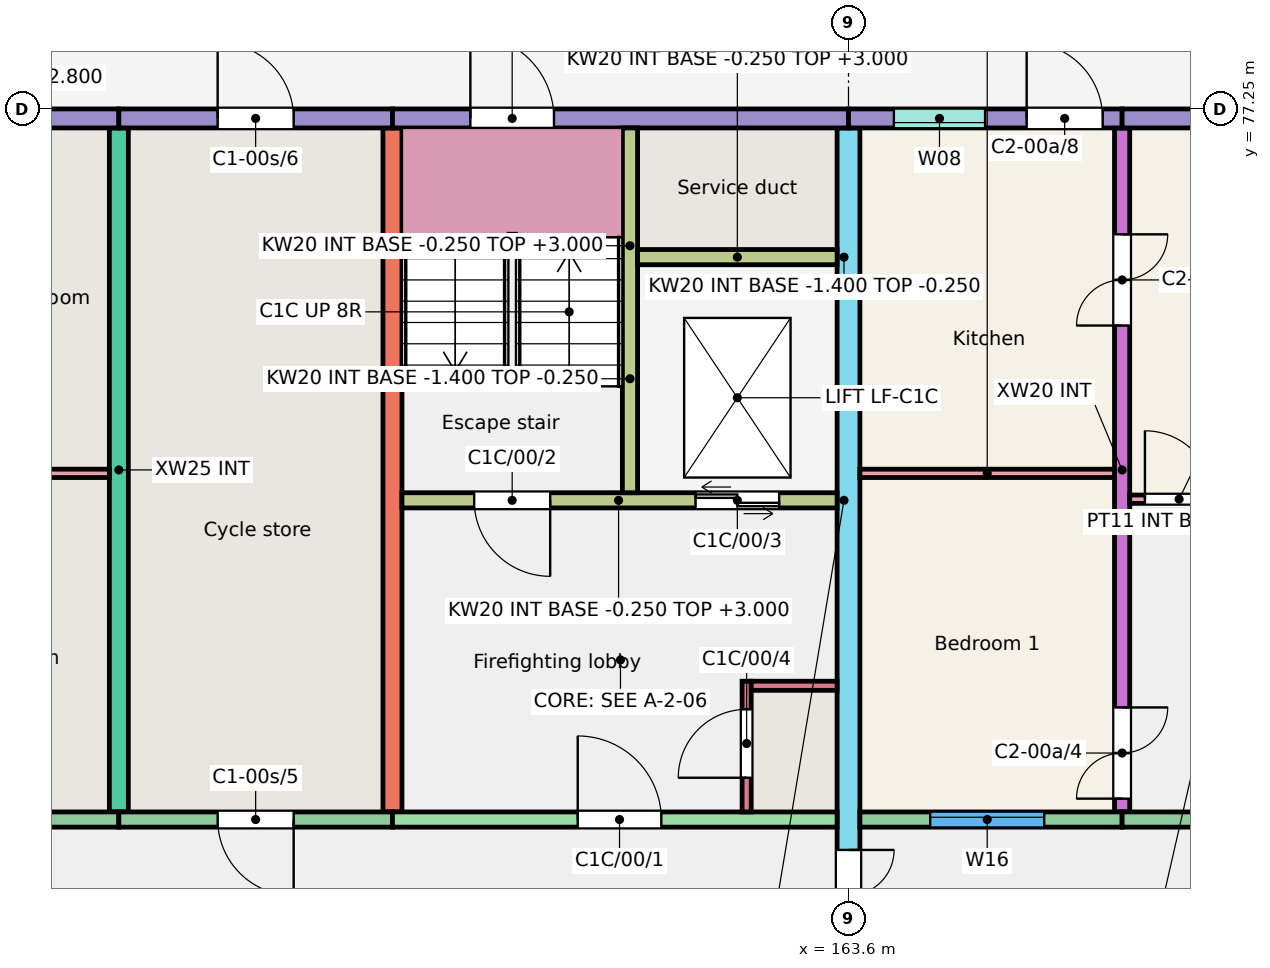
"""IFC4 building model, lengths in metres.
Left out: names, types, materials, properties, quantities, classifications, styles, units other than length and angle.
Written with IfcOpenShell. Run it as: python <this file> out.ifc"""

import sys

from ifc_helpers import new_model, si_unit, direction, frame, frame_2d, origin, place, context, subcontext, project, spatial, rectangle, extrude, element, fill, save


model = new_model("IFC4")
c1 = context("Model", 3, precision=1e-05, world=origin(), true_north=direction((0.0, 1.0)))
c2 = subcontext(c1, "Body", "Model", "MODEL_VIEW")
j1 = project(units=[si_unit("LENGTHUNIT", "METRE"), si_unit("PLANEANGLEUNIT", "RADIAN")], contexts=[c1])
p1 = place(None, origin())
s1 = spatial("IfcSite", under=j1, at=p1, CompositionType="ELEMENT")
p2 = place(p1, origin())
s2 = spatial("IfcBuilding", under=s1, at=p2, CompositionType="ELEMENT")
p3 = place(p2, origin())
s3 = spatial("IfcBuildingStorey", under=s2, at=p3, CompositionType="ELEMENT", Elevation=0.0)
for number, where, z_axis, x_axis in (
    (1, (154.0, 68.0, -0.25), (0.0, 0.0, 1.0), (0.0, 1.0, 0.0)),
    (2, (157.6, 68.0, -0.25), (0.0, 0.0, 1.0), (0.0, 1.0, 0.0)),
):
    element("IfcWall", number, at=place(p3, frame(where, z_axis=z_axis, x_axis=x_axis)), inside=s3, PredefinedType="SHEAR", context=c2, shape_type="SweptSolid", body=[
        extrude(rectangle(XDim=9.0, YDim=0.25, at=frame_2d((4.5, 0.0))), origin(), (0.0, 0.0, 1.0), 3.25),
    ])
p4 = place(p3, frame((163.6, 66.0, -0.25), z_axis=(0.0, 0.0, 1.0), x_axis=(0.0, 1.0, 0.0)))
e3 = element("IfcWall", 3, at=p4, inside=s3, PredefinedType="SHEAR", context=c2, shape_type="SweptSolid", body=[
    extrude(rectangle(XDim=11.0, YDim=0.3, at=frame_2d((5.5, 0.0))), origin(), (0.0, 0.0, 1.0), 3.25),
])
p5 = place(p4, frame((0.3, 0.0, 0.25)))
e4 = element("IfcOpeningElement", 4, at=p5, cuts=e3, PredefinedType="OPENING", context=c2, shape_type="SweptSolid", body=[
    extrude(rectangle(XDim=1.2, YDim=2.1, at=frame_2d((0.6, 1.05))), frame((0.0, 0.16, 0.0), z_axis=(0.0, -1.0, 0.0), x_axis=(1.0, 0.0, 0.0)), (0.0, 0.0, 1.0), 0.32),
])
p6 = place(p3, frame((167.2, 68.0, -0.25), z_axis=(0.0, 0.0, 1.0), x_axis=(0.0, 1.0, 0.0)))
e5 = element("IfcWall", 5, at=p6, inside=s3, PredefinedType="SHEAR", context=c2, shape_type="SweptSolid", body=[
    extrude(rectangle(XDim=9.0, YDim=0.2, at=frame_2d((4.5, 0.0))), origin(), (0.0, 0.0, 1.0), 3.25),
])
p7 = place(p6, frame((0.175, 0.0, 0.25)))
e6 = element("IfcOpeningElement", 6, at=p7, cuts=e5, PredefinedType="OPENING", context=c2, shape_type="SweptSolid", body=[
    extrude(rectangle(XDim=1.2, YDim=2.1, at=frame_2d((0.6, 1.05))), frame((0.0, 0.11, 0.0), z_axis=(0.0, -1.0, 0.0), x_axis=(1.0, 0.0, 0.0)), (0.0, 0.0, 1.0), 0.22),
])
p8 = place(p6, frame((6.4, 0.0, 0.25)))
e7 = element("IfcOpeningElement", 7, at=p8, cuts=e5, PredefinedType="OPENING", context=c2, shape_type="SweptSolid", body=[
    extrude(rectangle(XDim=1.2, YDim=2.1, at=frame_2d((0.6, 1.05))), frame((0.0, 0.11, 0.0), z_axis=(0.0, -1.0, 0.0), x_axis=(1.0, 0.0, 0.0)), (0.0, 0.0, 1.0), 0.22),
])
p9 = place(p3, frame((150.4, 77.125, -0.25), z_axis=(0.0, 0.0, 1.0), x_axis=(1.0, 0.0, 0.0)))
e8 = element("IfcWall", 8, at=p9, inside=s3, PredefinedType="SOLIDWALL", context=c2, shape_type="SweptSolid", body=[
    extrude(rectangle(XDim=3.6, YDim=0.25, at=frame_2d((1.8, 0.0))), origin(), (0.0, 0.0, 1.0), 3.25),
])
p10 = place(p3, frame((150.4, 67.9, -0.25), z_axis=(0.0, 0.0, 1.0), x_axis=(1.0, 0.0, 0.0)))
e9 = element("IfcWall", 9, at=p10, inside=s3, PredefinedType="SOLIDWALL", context=c2, shape_type="SweptSolid", body=[
    extrude(rectangle(XDim=3.6, YDim=0.2, at=frame_2d((1.8, 0.0))), origin(), (0.0, 0.0, 1.0), 3.25),
])
p11 = place(p10, frame((1.3, 0.0, 0.25)))
e10 = element("IfcOpeningElement", 10, at=p11, cuts=e9, PredefinedType="OPENING", context=c2, shape_type="SweptSolid", body=[
    extrude(rectangle(XDim=1.0, YDim=2.1, at=frame_2d((0.5, 1.05))), frame((0.0, 0.11, 0.0), z_axis=(0.0, -1.0, 0.0), x_axis=(1.0, 0.0, 0.0)), (0.0, 0.0, 1.0), 0.22),
])
p12 = place(p3, frame((154.0, 77.125, -0.25), z_axis=(0.0, 0.0, 1.0), x_axis=(1.0, 0.0, 0.0)))
e11 = element("IfcWall", 11, at=p12, inside=s3, PredefinedType="SOLIDWALL", context=c2, shape_type="SweptSolid", body=[
    extrude(rectangle(XDim=3.6, YDim=0.25, at=frame_2d((1.8, 0.0))), origin(), (0.0, 0.0, 1.0), 3.25),
])
p13 = place(p12, frame((1.3, 0.0, 0.25)))
e12 = element("IfcOpeningElement", 12, at=p13, cuts=e11, PredefinedType="OPENING", context=c2, shape_type="SweptSolid", body=[
    extrude(rectangle(XDim=1.0, YDim=2.1, at=frame_2d((0.5, 1.05))), frame((0.0, 0.135, 0.0), z_axis=(0.0, -1.0, 0.0), x_axis=(1.0, 0.0, 0.0)), (0.0, 0.0, 1.0), 0.27),
])
p14 = place(p3, frame((154.0, 67.9, -0.25), z_axis=(0.0, 0.0, 1.0), x_axis=(1.0, 0.0, 0.0)))
e13 = element("IfcWall", 13, at=p14, inside=s3, PredefinedType="SOLIDWALL", context=c2, shape_type="SweptSolid", body=[
    extrude(rectangle(XDim=3.6, YDim=0.2, at=frame_2d((1.8, 0.0))), origin(), (0.0, 0.0, 1.0), 3.25),
])
p15 = place(p14, frame((1.3, 0.0, 0.25)))
e14 = element("IfcOpeningElement", 14, at=p15, cuts=e13, PredefinedType="OPENING", context=c2, shape_type="SweptSolid", body=[
    extrude(rectangle(XDim=1.0, YDim=2.1, at=frame_2d((0.5, 1.05))), frame((0.0, 0.11, 0.0), z_axis=(0.0, -1.0, 0.0), x_axis=(1.0, 0.0, 0.0)), (0.0, 0.0, 1.0), 0.22),
])
p16 = place(p3, frame((157.6, 77.125, -0.25), z_axis=(0.0, 0.0, 1.0), x_axis=(1.0, 0.0, 0.0)))
e15 = element("IfcWall", 15, at=p16, inside=s3, PredefinedType="SOLIDWALL", context=c2, shape_type="SweptSolid", body=[
    extrude(rectangle(XDim=6.0, YDim=0.25, at=frame_2d((3.0, 0.0))), origin(), (0.0, 0.0, 1.0), 3.25),
])
p17 = place(p16, frame((1.025, 0.0, 0.25)))
e16 = element("IfcOpeningElement", 16, at=p17, cuts=e15, PredefinedType="OPENING", context=c2, shape_type="SweptSolid", body=[
    extrude(rectangle(XDim=1.1, YDim=2.1, at=frame_2d((0.55, 1.05))), frame((0.0, 0.135, 0.0), z_axis=(0.0, -1.0, 0.0), x_axis=(1.0, 0.0, 0.0)), (0.0, 0.0, 1.0), 0.27),
])
p18 = place(p3, frame((157.6, 67.9, -0.25), z_axis=(0.0, 0.0, 1.0), x_axis=(1.0, 0.0, 0.0)))
e17 = element("IfcWall", 17, at=p18, inside=s3, PredefinedType="SHEAR", context=c2, shape_type="SweptSolid", body=[
    extrude(rectangle(XDim=5.85, YDim=0.2, at=frame_2d((2.925, 0.0))), origin(), (0.0, 0.0, 1.0), 3.25),
])
p19 = place(p18, frame((2.438, 0.0, 0.25)))
e18 = element("IfcOpeningElement", 18, at=p19, cuts=e17, PredefinedType="OPENING", context=c2, shape_type="SweptSolid", body=[
    extrude(rectangle(XDim=1.1, YDim=2.1, at=frame_2d((0.55, 1.05))), frame((0.0, 0.11, 0.0), z_axis=(0.0, -1.0, 0.0), x_axis=(1.0, 0.0, 0.0)), (0.0, 0.0, 1.0), 0.22),
])
p20 = place(p3, frame((157.725, 72.1, -0.25), z_axis=(0.0, 0.0, 1.0), x_axis=(1.0, 0.0, 0.0)))
e19 = element("IfcWall", 19, at=p20, inside=s3, PredefinedType="SHEAR", context=c2, shape_type="SweptSolid", body=[
    extrude(rectangle(XDim=5.725, YDim=0.2, at=frame_2d((2.862, 0.0))), origin(), (0.0, 0.0, 1.0), 3.25),
])
p21 = place(p20, frame((0.95, 0.0, 0.25)))
e20 = element("IfcOpeningElement", 20, at=p21, cuts=e19, PredefinedType="OPENING", context=c2, shape_type="SweptSolid", body=[
    extrude(rectangle(XDim=1.0, YDim=2.1, at=frame_2d((0.5, 1.05))), frame((0.0, 0.11, 0.0), z_axis=(0.0, -1.0, 0.0), x_axis=(1.0, 0.0, 0.0)), (0.0, 0.0, 1.0), 0.22),
])
p22 = place(p20, frame((3.863, 0.0, 0.25)))
e21 = element("IfcOpeningElement", 21, at=p22, cuts=e19, PredefinedType="OPENING", context=c2, shape_type="SweptSolid", body=[
    extrude(rectangle(XDim=1.1, YDim=2.1, at=frame_2d((0.55, 1.05))), frame((0.0, 0.11, 0.0), z_axis=(0.0, -1.0, 0.0), x_axis=(1.0, 0.0, 0.0)), (0.0, 0.0, 1.0), 0.22),
])
p23 = place(p3, frame((160.725, 72.2, -0.25), z_axis=(0.0, 0.0, 1.0), x_axis=(0.0, 1.0, 0.0)))
e22 = element("IfcWall", 22, at=p23, inside=s3, PredefinedType="SHEAR", context=c2, shape_type="SweptSolid", body=[
    extrude(rectangle(XDim=4.8, YDim=0.2, at=frame_2d((2.4, 0.0))), origin(), (0.0, 0.0, 1.0), 3.25),
])
p24 = place(p3, frame((160.825, 75.3, -0.25), z_axis=(0.0, 0.0, 1.0), x_axis=(1.0, 0.0, 0.0)))
e23 = element("IfcWall", 23, at=p24, inside=s3, PredefinedType="SHEAR", context=c2, shape_type="SweptSolid", body=[
    extrude(rectangle(XDim=2.625, YDim=0.2, at=frame_2d((1.312, 0.0))), origin(), (0.0, 0.0, 1.0), 3.25),
])
p25 = place(p3, frame((162.26, 68.0, -0.25), z_axis=(0.0, 0.0, 1.0), x_axis=(0.0, 1.0, 0.0)))
e24 = element("IfcWall", 24, at=p25, inside=s3, PredefinedType="SHEAR", context=c2, shape_type="SweptSolid", body=[
    extrude(rectangle(XDim=1.72, YDim=0.12, at=frame_2d((0.86, 0.0))), origin(), (0.0, 0.0, 1.0), 3.25),
])
p26 = place(p25, frame((0.45, 0.0, 0.25)))
e25 = element("IfcOpeningElement", 25, at=p26, cuts=e24, PredefinedType="OPENING", context=c2, shape_type="SweptSolid", body=[
    extrude(rectangle(XDim=0.9, YDim=2.1, at=frame_2d((0.45, 1.05))), frame((0.0, 0.07, 0.0), z_axis=(0.0, -1.0, 0.0), x_axis=(1.0, 0.0, 0.0)), (0.0, 0.0, 1.0), 0.14),
])
p27 = place(p3, frame((162.32, 69.66, -0.25), z_axis=(0.0, 0.0, 1.0), x_axis=(1.0, 0.0, 0.0)))
e26 = element("IfcWall", 26, at=p27, inside=s3, PredefinedType="SHEAR", context=c2, shape_type="SweptSolid", body=[
    extrude(rectangle(XDim=1.13, YDim=0.12, at=frame_2d((0.565, 0.0))), origin(), (0.0, 0.0, 1.0), 3.25),
])
p28 = place(p3, frame((163.6, 77.125, -0.25), z_axis=(0.0, 0.0, 1.0), x_axis=(1.0, 0.0, 0.0)))
e27 = element("IfcWall", 27, at=p28, inside=s3, PredefinedType="SOLIDWALL", context=c2, shape_type="SweptSolid", body=[
    extrude(rectangle(XDim=3.6, YDim=0.25, at=frame_2d((1.8, 0.0))), origin(), (0.0, 0.0, 1.0), 3.25),
])
p29 = place(p28, frame((0.597, 0.0, 1.35)))
e28 = element("IfcOpeningElement", 28, at=p29, cuts=e27, PredefinedType="OPENING", context=c2, shape_type="SweptSolid", body=[
    extrude(rectangle(XDim=1.2, YDim=1.3, at=frame_2d((0.6, 0.65))), frame((0.0, 0.135, 0.0), z_axis=(0.0, -1.0, 0.0), x_axis=(1.0, 0.0, 0.0)), (0.0, 0.0, 1.0), 0.27),
])
p30 = place(p28, frame((2.344, 0.0, 0.25)))
e29 = element("IfcOpeningElement", 29, at=p30, cuts=e27, PredefinedType="OPENING", context=c2, shape_type="SweptSolid", body=[
    extrude(rectangle(XDim=1.0, YDim=2.1, at=frame_2d((0.5, 1.05))), frame((0.0, 0.135, 0.0), z_axis=(0.0, -1.0, 0.0), x_axis=(1.0, 0.0, 0.0)), (0.0, 0.0, 1.0), 0.27),
])
p31 = place(p3, frame((163.75, 67.9, -0.25), z_axis=(0.0, 0.0, 1.0), x_axis=(1.0, 0.0, 0.0)))
e30 = element("IfcWall", 30, at=p31, inside=s3, PredefinedType="SOLIDWALL", context=c2, shape_type="SweptSolid", body=[
    extrude(rectangle(XDim=3.45, YDim=0.2, at=frame_2d((1.725, 0.0))), origin(), (0.0, 0.0, 1.0), 3.25),
])
p32 = place(p31, frame((0.925, 0.0, 1.15)))
e31 = element("IfcOpeningElement", 31, at=p32, cuts=e30, PredefinedType="OPENING", context=c2, shape_type="SweptSolid", body=[
    extrude(rectangle(XDim=1.5, YDim=1.5, at=frame_2d((0.75, 0.75))), frame((0.0, 0.11, 0.0), z_axis=(0.0, -1.0, 0.0), x_axis=(1.0, 0.0, 0.0)), (0.0, 0.0, 1.0), 0.22),
])
p33 = place(p3, frame((167.2, 77.125, -0.25), z_axis=(0.0, 0.0, 1.0), x_axis=(1.0, 0.0, 0.0)))
e32 = element("IfcWall", 32, at=p33, inside=s3, PredefinedType="SOLIDWALL", context=c2, shape_type="SweptSolid", body=[
    extrude(rectangle(XDim=3.6, YDim=0.25, at=frame_2d((1.8, 0.0))), origin(), (0.0, 0.0, 1.0), 3.25),
])
p34 = place(p33, frame((1.038, 0.0, 1.15)))
e33 = element("IfcOpeningElement", 33, at=p34, cuts=e32, PredefinedType="OPENING", context=c2, shape_type="SweptSolid", body=[
    extrude(rectangle(XDim=1.5, YDim=1.5, at=frame_2d((0.75, 0.75))), frame((0.0, 0.135, 0.0), z_axis=(0.0, -1.0, 0.0), x_axis=(1.0, 0.0, 0.0)), (0.0, 0.0, 1.0), 0.27),
])
p35 = place(p3, frame((167.2, 67.9, -0.25), z_axis=(0.0, 0.0, 1.0), x_axis=(1.0, 0.0, 0.0)))
e34 = element("IfcWall", 34, at=p35, inside=s3, PredefinedType="SOLIDWALL", context=c2, shape_type="SweptSolid", body=[
    extrude(rectangle(XDim=3.6, YDim=0.2, at=frame_2d((1.8, 0.0))), origin(), (0.0, 0.0, 1.0), 3.25),
])
p36 = place(p35, frame((1.288, 0.0, 0.25)))
e35 = element("IfcOpeningElement", 35, at=p36, cuts=e34, PredefinedType="OPENING", context=c2, shape_type="SweptSolid", body=[
    extrude(rectangle(XDim=1.0, YDim=2.1, at=frame_2d((0.5, 1.05))), frame((0.0, 0.11, 0.0), z_axis=(0.0, -1.0, 0.0), x_axis=(1.0, 0.0, 0.0)), (0.0, 0.0, 1.0), 0.22),
])
for number, where, z_axis, x_axis in (
    (36, (160.625, 72.1, -1.4), (0.0, 0.0, 1.0), (1.0, 0.0, 0.0)),
    (37, (160.625, 75.3, -1.4), (0.0, 0.0, 1.0), (1.0, 0.0, 0.0)),
):
    element("IfcWall", number, at=place(p3, frame(where, z_axis=z_axis, x_axis=x_axis)), inside=s3, PredefinedType="SHEAR", context=c2, shape_type="SweptSolid", body=[
        extrude(rectangle(XDim=2.975, YDim=0.2, at=frame_2d((1.488, 0.0))), origin(), (0.0, 0.0, 1.0), 1.15),
    ])
p37 = place(p3, frame((160.725, 72.2, -1.4), z_axis=(0.0, 0.0, 1.0), x_axis=(0.0, 1.0, 0.0)))
e38 = element("IfcWall", 38, at=p37, inside=s3, PredefinedType="SHEAR", context=c2, shape_type="SweptSolid", body=[
    extrude(rectangle(XDim=3.0, YDim=0.2, at=frame_2d((1.5, 0.0))), origin(), (0.0, 0.0, 1.0), 1.15),
])
p38 = place(p3, frame((163.525, 72.2, -1.4), z_axis=(0.0, 0.0, 1.0), x_axis=(0.0, 1.0, 0.0)))
e39 = element("IfcWall", 39, at=p38, inside=s3, PredefinedType="SHEAR", context=c2, shape_type="SweptSolid", body=[
    extrude(rectangle(XDim=3.0, YDim=0.15, at=frame_2d((1.5, 0.0))), origin(), (0.0, 0.0, 1.0), 1.15),
])
p39 = place(p3, frame((150.525, 72.455, 0.0), z_axis=(0.0, 0.0, 1.0), x_axis=(1.0, 0.0, 0.0)))
e40 = element("IfcWall", 40, at=p39, inside=s3, PredefinedType="PARTITIONING", context=c2, shape_type="SweptSolid", body=[
    extrude(rectangle(XDim=3.35, YDim=0.11, at=frame_2d((1.675, 0.0))), origin(), (0.0, 0.0, 1.0), 2.8),
])
p40 = place(p39, frame((1.225, 0.0, 0.0)))
e41 = element("IfcOpeningElement", 41, at=p40, cuts=e40, PredefinedType="OPENING", context=c2, shape_type="SweptSolid", body=[
    extrude(rectangle(XDim=0.9, YDim=2.1, at=frame_2d((0.45, 1.05))), frame((0.0, 0.065, 0.0), z_axis=(0.0, -1.0, 0.0), x_axis=(1.0, 0.0, 0.0)), (0.0, 0.0, 1.0), 0.13),
])
p41 = place(p3, frame((167.3, 72.115, 0.0), z_axis=(0.0, 0.0, 1.0), x_axis=(1.0, 0.0, 0.0)))
e42 = element("IfcWall", 42, at=p41, inside=s3, PredefinedType="PARTITIONING", context=c2, shape_type="SweptSolid", body=[
    extrude(rectangle(XDim=3.375, YDim=0.11, at=frame_2d((1.688, 0.0))), origin(), (0.0, 0.0, 1.0), 2.8),
])
p42 = place(p41, frame((0.2, 0.0, 0.0)))
e43 = element("IfcOpeningElement", 43, at=p42, cuts=e42, PredefinedType="OPENING", context=c2, shape_type="SweptSolid", body=[
    extrude(rectangle(XDim=0.9, YDim=2.1, at=frame_2d((0.45, 1.05))), frame((0.0, 0.065, 0.0), z_axis=(0.0, -1.0, 0.0), x_axis=(1.0, 0.0, 0.0)), (0.0, 0.0, 1.0), 0.13),
])
p43 = place(p3, frame((163.75, 72.455, 0.0), z_axis=(0.0, 0.0, 1.0), x_axis=(1.0, 0.0, 0.0)))
e44 = element("IfcWall", 44, at=p43, inside=s3, PredefinedType="PARTITIONING", context=c2, shape_type="SweptSolid", body=[
    extrude(rectangle(XDim=3.35, YDim=0.11, at=frame_2d((1.675, 0.0))), origin(), (0.0, 0.0, 1.0), 2.8),
])
p44 = place(p32, origin())
e45 = element("IfcWindow", 45, at=p44, inside=s3, PartitioningType="SINGLE_PANEL", PredefinedType="WINDOW", context=c2, shape_type="SweptSolid", body=[
    extrude(rectangle(XDim=1.5, YDim=1.5, at=frame_2d((0.75, 0.75))), frame((0.0, 0.06, 0.0), z_axis=(0.0, -1.0, 0.0), x_axis=(1.0, 0.0, 0.0)), (0.0, 0.0, 1.0), 0.06),
])
fill(e31, e45)
p45 = place(p29, origin())
e46 = element("IfcWindow", 46, at=p45, inside=s3, PartitioningType="SINGLE_PANEL", PredefinedType="WINDOW", context=c2, shape_type="SweptSolid", body=[
    extrude(rectangle(XDim=1.2, YDim=1.3, at=frame_2d((0.6, 0.65))), frame((0.0, -0.025, 0.0), z_axis=(0.0, -1.0, 0.0), x_axis=(1.0, 0.0, 0.0)), (0.0, 0.0, 1.0), 0.06),
])
fill(e28, e46)
p46 = place(p15, origin())
e47 = element("IfcDoor", 47, at=p46, inside=s3, OperationType="SINGLE_SWING_RIGHT", PredefinedType="DOOR", context=c2, shape_type="SweptSolid", body=[
    extrude(rectangle(XDim=1.0, YDim=2.1, at=frame_2d((0.5, 1.05))), frame((0.0, 0.025, 0.0), z_axis=(0.0, -1.0, 0.0), x_axis=(1.0, 0.0, 0.0)), (0.0, 0.0, 1.0), 0.05),
])
fill(e14, e47)
p47 = place(p13, origin())
e48 = element("IfcDoor", 48, at=p47, inside=s3, OperationType="SINGLE_SWING_LEFT", PredefinedType="DOOR", context=c2, shape_type="SweptSolid", body=[
    extrude(rectangle(XDim=1.0, YDim=2.1, at=frame_2d((0.5, 1.05))), frame((0.0, 0.025, 0.0), z_axis=(0.0, -1.0, 0.0), x_axis=(1.0, 0.0, 0.0)), (0.0, 0.0, 1.0), 0.05),
])
fill(e12, e48)
p48 = place(p42, origin())
e49 = element("IfcDoor", 49, at=p48, inside=s3, OperationType="SINGLE_SWING_LEFT", PredefinedType="DOOR", context=c2, shape_type="SweptSolid", body=[
    extrude(rectangle(XDim=0.9, YDim=2.1, at=frame_2d((0.45, 1.05))), frame((0.0, 0.025, 0.0), z_axis=(0.0, -1.0, 0.0), x_axis=(1.0, 0.0, 0.0)), (0.0, 0.0, 1.0), 0.05),
])
fill(e43, e49)
p49 = place(p7, origin())
e50 = element("IfcDoor", 50, at=p49, inside=s3, OperationType="DOUBLE_DOOR_SINGLE_SWING", PredefinedType="DOOR", context=c2, shape_type="SweptSolid", body=[
    extrude(rectangle(XDim=1.2, YDim=2.1, at=frame_2d((0.6, 1.05))), frame((0.0, 0.025, 0.0), z_axis=(0.0, -1.0, 0.0), x_axis=(1.0, 0.0, 0.0)), (0.0, 0.0, 1.0), 0.05),
])
fill(e6, e50)
p50 = place(p8, origin())
e51 = element("IfcDoor", 51, at=p50, inside=s3, OperationType="DOUBLE_DOOR_SINGLE_SWING", PredefinedType="DOOR", context=c2, shape_type="SweptSolid", body=[
    extrude(rectangle(XDim=1.2, YDim=2.1, at=frame_2d((0.6, 1.05))), frame((0.0, 0.025, 0.0), z_axis=(0.0, -1.0, 0.0), x_axis=(1.0, 0.0, 0.0)), (0.0, 0.0, 1.0), 0.05),
])
fill(e7, e51)
p51 = place(p30, origin())
e52 = element("IfcDoor", 52, at=p51, inside=s3, OperationType="SINGLE_SWING_LEFT", PredefinedType="DOOR", context=c2, shape_type="SweptSolid", body=[
    extrude(rectangle(XDim=1.0, YDim=2.1, at=frame_2d((0.5, 1.05))), frame((0.0, 0.025, 0.0), z_axis=(0.0, -1.0, 0.0), x_axis=(1.0, 0.0, 0.0)), (0.0, 0.0, 1.0), 0.05),
])
fill(e29, e52)
p52 = place(p19, origin())
e53 = element("IfcDoor", 53, at=p52, inside=s3, OperationType="SINGLE_SWING_LEFT", PredefinedType="DOOR", context=c2, shape_type="SweptSolid", body=[
    extrude(rectangle(XDim=1.1, YDim=2.1, at=frame_2d((0.55, 1.05))), frame((0.0, 0.025, 0.0), z_axis=(0.0, -1.0, 0.0), x_axis=(1.0, 0.0, 0.0)), (0.0, 0.0, 1.0), 0.05),
])
fill(e18, e53)
p53 = place(p21, origin())
e54 = element("IfcDoor", 54, at=p53, inside=s3, OperationType="SINGLE_SWING_RIGHT", PredefinedType="DOOR", context=c2, shape_type="SweptSolid", body=[
    extrude(rectangle(XDim=1.0, YDim=2.1, at=frame_2d((0.5, 1.05))), frame((0.0, 0.025, 0.0), z_axis=(0.0, -1.0, 0.0), x_axis=(1.0, 0.0, 0.0)), (0.0, 0.0, 1.0), 0.05),
])
fill(e20, e54)
p54 = place(p22, origin())
e55 = element("IfcDoor", 55, at=p54, inside=s3, OperationType="DOUBLE_DOOR_SLIDING", PredefinedType="DOOR", context=c2, shape_type="SweptSolid", body=[
    extrude(rectangle(XDim=1.1, YDim=2.1, at=frame_2d((0.55, 1.05))), frame((0.0, 0.025, 0.0), z_axis=(0.0, -1.0, 0.0), x_axis=(1.0, 0.0, 0.0)), (0.0, 0.0, 1.0), 0.05),
])
fill(e21, e55)
p55 = place(p26, origin())
e56 = element("IfcDoor", 56, at=p55, inside=s3, OperationType="SINGLE_SWING_LEFT", PredefinedType="DOOR", context=c2, shape_type="SweptSolid", body=[
    extrude(rectangle(XDim=0.9, YDim=2.1, at=frame_2d((0.45, 1.05))), frame((0.0, 0.025, 0.0), z_axis=(0.0, -1.0, 0.0), x_axis=(1.0, 0.0, 0.0)), (0.0, 0.0, 1.0), 0.05),
])
fill(e25, e56)
p56 = place(p17, origin())
e57 = element("IfcDoor", 57, at=p56, inside=s3, OperationType="SINGLE_SWING_LEFT", PredefinedType="DOOR", context=c2, shape_type="SweptSolid", body=[
    extrude(rectangle(XDim=1.1, YDim=2.1, at=frame_2d((0.55, 1.05))), frame((0.0, 0.025, 0.0), z_axis=(0.0, -1.0, 0.0), x_axis=(1.0, 0.0, 0.0)), (0.0, 0.0, 1.0), 0.05),
])
fill(e16, e57)
p57 = place(p5, origin())
e58 = element("IfcDoor", 58, at=p57, inside=s3, OperationType="DOUBLE_DOOR_SINGLE_SWING", PredefinedType="DOOR", context=c2, shape_type="SweptSolid", body=[
    extrude(rectangle(XDim=1.2, YDim=2.1, at=frame_2d((0.6, 1.05))), frame((0.0, 0.025, 0.0), z_axis=(0.0, -1.0, 0.0), x_axis=(1.0, 0.0, 0.0)), (0.0, 0.0, 1.0), 0.05),
])
fill(e4, e58)
save(model, sys.argv[1])
